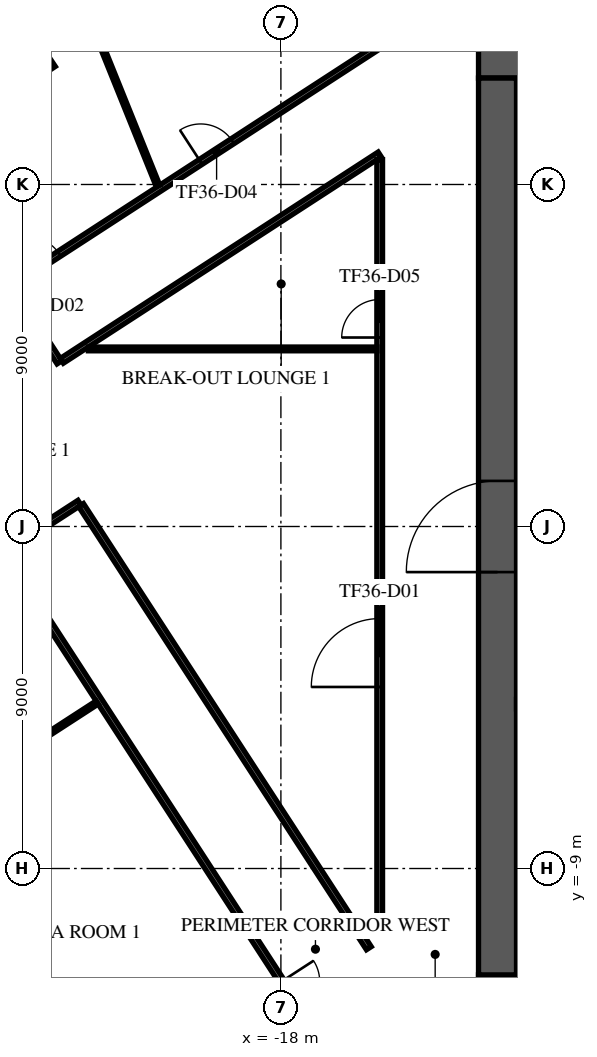
"""IFC4 building model, lengths in metres.
Left out: names, types, materials, properties, quantities, classifications, styles, units other than length and angle.
Written with IfcOpenShell. Run it as: python <this file> out.ifc"""

import sys

from ifc_helpers import new_model, si_unit, direction, frame, frame_2d, origin, origin_2d, place, context, subcontext, project, spatial, rectangle, extrude, element, fill, save


model = new_model("IFC4")
c1 = context("Model", 3, precision=1e-05, world=origin(), true_north=direction((0.0, 1.0)))
c2 = subcontext(c1, "Body", "Model", "MODEL_VIEW")
j1 = project(units=[si_unit("LENGTHUNIT", "METRE"), si_unit("PLANEANGLEUNIT", "RADIAN")], contexts=[c1])
p1 = place(None, origin())
s1 = spatial("IfcSite", under=j1, at=p1, CompositionType="ELEMENT")
p2 = place(p1, origin())
s2 = spatial("IfcBuilding", under=s1, at=p2, CompositionType="ELEMENT")
p3 = place(p2, frame((0.0, 0.0, 155.7)))
s3 = spatial("IfcBuildingStorey", under=s2, at=p3, CompositionType="ELEMENT", Elevation=155.7)
p4 = place(p3, frame((-24.699, 12.258, 0.0), z_axis=(0.0, 0.0, 1.0), x_axis=(0.832028680356, 0.55473261583, 0.0)))
e1 = element("IfcColumn", 1, at=p4, inside=s3, PredefinedType="COLUMN", context=c2, shape_type="SweptSolid", body=[
    extrude(rectangle(XDim=1.1, YDim=1.1, at=origin_2d()), origin(), (0.0, 0.0, 1.0), 4.0),
])
p5 = place(p3, frame((-12.8, 12.3, 0.0), z_axis=(0.0, 0.0, 1.0), x_axis=(1.0, 0.0, 0.0)))
e2 = element("IfcWall", 2, at=p5, inside=s3, PredefinedType="SHEAR", context=c2, shape_type="SweptSolid", body=[
    extrude(rectangle(XDim=25.6, YDim=1.0, at=frame_2d((12.8, 0.0))), origin(), (0.0, 0.0, 1.0), 3.6),
])
p6 = place(p5, frame((11.6, 0.0, 0.0)))
e3 = element("IfcOpeningElement", 3, at=p6, cuts=e2, PredefinedType="OPENING", context=c2, shape_type="SweptSolid", body=[
    extrude(rectangle(XDim=2.4, YDim=2.4, at=frame_2d((1.2, 1.2))), frame((0.0, 0.51, 0.0), z_axis=(0.0, -1.0, 0.0), x_axis=(1.0, 0.0, 0.0)), (0.0, 0.0, 1.0), 1.02),
])
p7 = place(p5, frame((22.425, 0.0, 0.0)))
e4 = element("IfcOpeningElement", 4, at=p7, cuts=e2, PredefinedType="OPENING", context=c2, shape_type="SweptSolid", body=[
    extrude(rectangle(XDim=1.2, YDim=2.1, at=frame_2d((0.6, 1.05))), frame((0.0, 0.51, 0.0), z_axis=(0.0, -1.0, 0.0), x_axis=(1.0, 0.0, 0.0)), (0.0, 0.0, 1.0), 1.02),
])
p8 = place(p5, frame((1.4, 0.0, 0.0)))
e5 = element("IfcOpeningElement", 5, at=p8, cuts=e2, PredefinedType="OPENING", context=c2, shape_type="SweptSolid", body=[
    extrude(rectangle(XDim=1.0, YDim=2.1, at=frame_2d((0.5, 1.05))), frame((0.0, 0.51, 0.0), z_axis=(0.0, -1.0, 0.0), x_axis=(1.0, 0.0, 0.0)), (0.0, 0.0, 1.0), 1.02),
])
p9 = place(p3, frame((-12.8, -12.3, 0.0), z_axis=(0.0, 0.0, 1.0), x_axis=(1.0, 0.0, 0.0)))
e6 = element("IfcWall", 6, at=p9, inside=s3, PredefinedType="SHEAR", context=c2, shape_type="SweptSolid", body=[
    extrude(rectangle(XDim=25.6, YDim=1.0, at=frame_2d((12.8, 0.0))), origin(), (0.0, 0.0, 1.0), 3.6),
])
p10 = place(p9, frame((7.7, 0.0, 0.0)))
e7 = element("IfcOpeningElement", 7, at=p10, cuts=e6, PredefinedType="OPENING", context=c2, shape_type="SweptSolid", body=[
    extrude(rectangle(XDim=2.0, YDim=2.1, at=frame_2d((1.0, 1.05))), frame((0.0, 0.51, 0.0), z_axis=(0.0, -1.0, 0.0), x_axis=(1.0, 0.0, 0.0)), (0.0, 0.0, 1.0), 1.02),
])
p11 = place(p9, frame((17.825, 0.0, 0.0)))
e8 = element("IfcOpeningElement", 8, at=p11, cuts=e6, PredefinedType="OPENING", context=c2, shape_type="SweptSolid", body=[
    extrude(rectangle(XDim=1.2, YDim=2.1, at=frame_2d((0.6, 1.05))), frame((0.0, 0.51, 0.0), z_axis=(0.0, -1.0, 0.0), x_axis=(1.0, 0.0, 0.0)), (0.0, 0.0, 1.0), 1.02),
])
p12 = place(p9, frame((1.975, 0.0, 0.0)))
e9 = element("IfcOpeningElement", 9, at=p12, cuts=e6, PredefinedType="OPENING", context=c2, shape_type="SweptSolid", body=[
    extrude(rectangle(XDim=1.2, YDim=2.1, at=frame_2d((0.6, 1.05))), frame((0.0, 0.51, 0.0), z_axis=(0.0, -1.0, 0.0), x_axis=(1.0, 0.0, 0.0)), (0.0, 0.0, 1.0), 1.02),
])
p13 = place(p9, frame((22.425, 0.0, 0.0)))
e10 = element("IfcOpeningElement", 10, at=p13, cuts=e6, PredefinedType="OPENING", context=c2, shape_type="SweptSolid", body=[
    extrude(rectangle(XDim=1.2, YDim=2.1, at=frame_2d((0.6, 1.05))), frame((0.0, 0.51, 0.0), z_axis=(0.0, -1.0, 0.0), x_axis=(1.0, 0.0, 0.0)), (0.0, 0.0, 1.0), 1.02),
])
p14 = place(p3, frame((-12.3, -11.8, 0.0), z_axis=(0.0, 0.0, 1.0), x_axis=(0.0, 1.0, 0.0)))
e11 = element("IfcWall", 11, at=p14, inside=s3, PredefinedType="SHEAR", context=c2, shape_type="SweptSolid", body=[
    extrude(rectangle(XDim=23.6, YDim=1.0, at=frame_2d((11.8, 0.0))), origin(), (0.0, 0.0, 1.0), 3.6),
])
p15 = place(p14, frame((10.6, 0.0, 0.0)))
e12 = element("IfcOpeningElement", 12, at=p15, cuts=e11, PredefinedType="OPENING", context=c2, shape_type="SweptSolid", body=[
    extrude(rectangle(XDim=2.4, YDim=2.4, at=frame_2d((1.2, 1.2))), frame((0.0, 0.51, 0.0), z_axis=(0.0, -1.0, 0.0), x_axis=(1.0, 0.0, 0.0)), (0.0, 0.0, 1.0), 1.02),
])
p16 = place(p3, frame((-8.65, -4.675, 0.0), z_axis=(0.0, 0.0, 1.0), x_axis=(-1.0, 0.0, 0.0)))
e13 = element("IfcWall", 13, at=p16, inside=s3, PredefinedType="SOLIDWALL", context=c2, shape_type="SweptSolid", body=[
    extrude(rectangle(XDim=3.15, YDim=0.25, at=frame_2d((1.575, 0.0))), origin(), (0.0, 0.0, 1.0), 3.6),
])
p17 = place(p3, frame((6.333, 35.233, 0.0), z_axis=(0.0, 0.0, 1.0), x_axis=(-0.83867264201, -0.544635841222, 0.0)))
e14 = element("IfcWall", 14, at=p17, inside=s3, PredefinedType="STANDARD", context=c2, shape_type="SweptSolid", body=[
    extrude(rectangle(XDim=49.376, YDim=0.6, at=frame_2d((24.688, 0.0))), origin(), (0.0, 0.0, 1.0), 3.6),
])
p18 = place(p17, frame((1.2, 0.0, 0.9)))
e15 = element("IfcOpeningElement", 15, at=p18, cuts=e14, PredefinedType="OPENING", context=c2, shape_type="SweptSolid", body=[
    extrude(rectangle(XDim=2.1, YDim=2.1, at=frame_2d((1.05, 1.05))), frame((0.0, 0.31, 0.0), z_axis=(0.0, -1.0, 0.0), x_axis=(1.0, 0.0, 0.0)), (0.0, 0.0, 1.0), 0.62),
])
p19 = place(p17, frame((5.7, 0.0, 0.9)))
e16 = element("IfcOpeningElement", 16, at=p19, cuts=e14, PredefinedType="OPENING", context=c2, shape_type="SweptSolid", body=[
    extrude(rectangle(XDim=2.1, YDim=2.1, at=frame_2d((1.05, 1.05))), frame((0.0, 0.31, 0.0), z_axis=(0.0, -1.0, 0.0), x_axis=(1.0, 0.0, 0.0)), (0.0, 0.0, 1.0), 0.62),
])
p20 = place(p17, frame((10.2, 0.0, 0.9)))
e17 = element("IfcOpeningElement", 17, at=p20, cuts=e14, PredefinedType="OPENING", context=c2, shape_type="SweptSolid", body=[
    extrude(rectangle(XDim=2.1, YDim=2.1, at=frame_2d((1.05, 1.05))), frame((0.0, 0.31, 0.0), z_axis=(0.0, -1.0, 0.0), x_axis=(1.0, 0.0, 0.0)), (0.0, 0.0, 1.0), 0.62),
])
p21 = place(p17, frame((14.7, 0.0, 0.9)))
e18 = element("IfcOpeningElement", 18, at=p21, cuts=e14, PredefinedType="OPENING", context=c2, shape_type="SweptSolid", body=[
    extrude(rectangle(XDim=2.1, YDim=2.1, at=frame_2d((1.05, 1.05))), frame((0.0, 0.31, 0.0), z_axis=(0.0, -1.0, 0.0), x_axis=(1.0, 0.0, 0.0)), (0.0, 0.0, 1.0), 0.62),
])
p22 = place(p17, frame((19.2, 0.0, 0.9)))
e19 = element("IfcOpeningElement", 19, at=p22, cuts=e14, PredefinedType="OPENING", context=c2, shape_type="SweptSolid", body=[
    extrude(rectangle(XDim=2.1, YDim=2.1, at=frame_2d((1.05, 1.05))), frame((0.0, 0.31, 0.0), z_axis=(0.0, -1.0, 0.0), x_axis=(1.0, 0.0, 0.0)), (0.0, 0.0, 1.0), 0.62),
])
p23 = place(p17, frame((23.7, 0.0, 0.9)))
e20 = element("IfcOpeningElement", 20, at=p23, cuts=e14, PredefinedType="OPENING", context=c2, shape_type="SweptSolid", body=[
    extrude(rectangle(XDim=2.1, YDim=2.1, at=frame_2d((1.05, 1.05))), frame((0.0, 0.31, 0.0), z_axis=(0.0, -1.0, 0.0), x_axis=(1.0, 0.0, 0.0)), (0.0, 0.0, 1.0), 0.62),
])
p24 = place(p17, frame((28.2, 0.0, 0.9)))
e21 = element("IfcOpeningElement", 21, at=p24, cuts=e14, PredefinedType="OPENING", context=c2, shape_type="SweptSolid", body=[
    extrude(rectangle(XDim=2.1, YDim=2.1, at=frame_2d((1.05, 1.05))), frame((0.0, 0.31, 0.0), z_axis=(0.0, -1.0, 0.0), x_axis=(1.0, 0.0, 0.0)), (0.0, 0.0, 1.0), 0.62),
])
p25 = place(p17, frame((32.7, 0.0, 0.9)))
e22 = element("IfcOpeningElement", 22, at=p25, cuts=e14, PredefinedType="OPENING", context=c2, shape_type="SweptSolid", body=[
    extrude(rectangle(XDim=2.1, YDim=2.1, at=frame_2d((1.05, 1.05))), frame((0.0, 0.31, 0.0), z_axis=(0.0, -1.0, 0.0), x_axis=(1.0, 0.0, 0.0)), (0.0, 0.0, 1.0), 0.62),
])
p26 = place(p17, frame((37.2, 0.0, 0.9)))
e23 = element("IfcOpeningElement", 23, at=p26, cuts=e14, PredefinedType="OPENING", context=c2, shape_type="SweptSolid", body=[
    extrude(rectangle(XDim=2.1, YDim=2.1, at=frame_2d((1.05, 1.05))), frame((0.0, 0.31, 0.0), z_axis=(0.0, -1.0, 0.0), x_axis=(1.0, 0.0, 0.0)), (0.0, 0.0, 1.0), 0.62),
])
p27 = place(p17, frame((41.7, 0.0, 0.9)))
e24 = element("IfcOpeningElement", 24, at=p27, cuts=e14, PredefinedType="OPENING", context=c2, shape_type="SweptSolid", body=[
    extrude(rectangle(XDim=2.1, YDim=2.1, at=frame_2d((1.05, 1.05))), frame((0.0, 0.31, 0.0), z_axis=(0.0, -1.0, 0.0), x_axis=(1.0, 0.0, 0.0)), (0.0, 0.0, 1.0), 0.62),
])
p28 = place(p17, frame((46.138, 0.0, 0.9)))
e25 = element("IfcOpeningElement", 25, at=p28, cuts=e14, PredefinedType="OPENING", context=c2, shape_type="SweptSolid", body=[
    extrude(rectangle(XDim=2.1, YDim=2.1, at=frame_2d((1.05, 1.05))), frame((0.0, 0.31, 0.0), z_axis=(0.0, -1.0, 0.0), x_axis=(1.0, 0.0, 0.0)), (0.0, 0.0, 1.0), 0.62),
])
p29 = place(p3, frame((-36.496, 1.667, 0.0), z_axis=(0.0, 0.0, 1.0), x_axis=(0.544642236407, -0.838668488929, 0.0)))
e26 = element("IfcWall", 26, at=p29, inside=s3, PredefinedType="STANDARD", context=c2, shape_type="SweptSolid", body=[
    extrude(rectangle(XDim=42.552, YDim=0.6, at=frame_2d((21.276, 0.0))), origin(), (0.0, 0.0, 1.0), 3.6),
])
p30 = place(p29, frame((1.178, 0.0, 0.9)))
e27 = element("IfcOpeningElement", 27, at=p30, cuts=e26, PredefinedType="OPENING", context=c2, shape_type="SweptSolid", body=[
    extrude(rectangle(XDim=1.8, YDim=2.1, at=frame_2d((0.9, 1.05))), frame((0.0, 0.31, 0.0), z_axis=(0.0, -1.0, 0.0), x_axis=(1.0, 0.0, 0.0)), (0.0, 0.0, 1.0), 0.62),
])
p31 = place(p29, frame((5.396, 0.0, 0.9)))
e28 = element("IfcOpeningElement", 28, at=p31, cuts=e26, PredefinedType="OPENING", context=c2, shape_type="SweptSolid", body=[
    extrude(rectangle(XDim=1.8, YDim=2.1, at=frame_2d((0.9, 1.05))), frame((0.0, 0.31, 0.0), z_axis=(0.0, -1.0, 0.0), x_axis=(1.0, 0.0, 0.0)), (0.0, 0.0, 1.0), 0.62),
])
p32 = place(p29, frame((9.676, 0.0, 0.9)))
e29 = element("IfcOpeningElement", 29, at=p32, cuts=e26, PredefinedType="OPENING", context=c2, shape_type="SweptSolid", body=[
    extrude(rectangle(XDim=1.8, YDim=2.1, at=frame_2d((0.9, 1.05))), frame((0.0, 0.31, 0.0), z_axis=(0.0, -1.0, 0.0), x_axis=(1.0, 0.0, 0.0)), (0.0, 0.0, 1.0), 0.62),
])
p33 = place(p29, frame((13.956, 0.0, 0.9)))
e30 = element("IfcOpeningElement", 30, at=p33, cuts=e26, PredefinedType="OPENING", context=c2, shape_type="SweptSolid", body=[
    extrude(rectangle(XDim=1.8, YDim=2.1, at=frame_2d((0.9, 1.05))), frame((0.0, 0.31, 0.0), z_axis=(0.0, -1.0, 0.0), x_axis=(1.0, 0.0, 0.0)), (0.0, 0.0, 1.0), 0.62),
])
p34 = place(p29, frame((18.236, 0.0, 0.9)))
e31 = element("IfcOpeningElement", 31, at=p34, cuts=e26, PredefinedType="OPENING", context=c2, shape_type="SweptSolid", body=[
    extrude(rectangle(XDim=1.8, YDim=2.1, at=frame_2d((0.9, 1.05))), frame((0.0, 0.31, 0.0), z_axis=(0.0, -1.0, 0.0), x_axis=(1.0, 0.0, 0.0)), (0.0, 0.0, 1.0), 0.62),
])
p35 = place(p29, frame((22.516, 0.0, 0.9)))
e32 = element("IfcOpeningElement", 32, at=p35, cuts=e26, PredefinedType="OPENING", context=c2, shape_type="SweptSolid", body=[
    extrude(rectangle(XDim=1.8, YDim=2.1, at=frame_2d((0.9, 1.05))), frame((0.0, 0.31, 0.0), z_axis=(0.0, -1.0, 0.0), x_axis=(1.0, 0.0, 0.0)), (0.0, 0.0, 1.0), 0.62),
])
p36 = place(p29, frame((26.796, 0.0, 0.9)))
e33 = element("IfcOpeningElement", 33, at=p36, cuts=e26, PredefinedType="OPENING", context=c2, shape_type="SweptSolid", body=[
    extrude(rectangle(XDim=1.8, YDim=2.1, at=frame_2d((0.9, 1.05))), frame((0.0, 0.31, 0.0), z_axis=(0.0, -1.0, 0.0), x_axis=(1.0, 0.0, 0.0)), (0.0, 0.0, 1.0), 0.62),
])
p37 = place(p29, frame((31.076, 0.0, 0.9)))
e34 = element("IfcOpeningElement", 34, at=p37, cuts=e26, PredefinedType="OPENING", context=c2, shape_type="SweptSolid", body=[
    extrude(rectangle(XDim=1.8, YDim=2.1, at=frame_2d((0.9, 1.05))), frame((0.0, 0.31, 0.0), z_axis=(0.0, -1.0, 0.0), x_axis=(1.0, 0.0, 0.0)), (0.0, 0.0, 1.0), 0.62),
])
p38 = place(p29, frame((35.356, 0.0, 0.9)))
e35 = element("IfcOpeningElement", 35, at=p38, cuts=e26, PredefinedType="OPENING", context=c2, shape_type="SweptSolid", body=[
    extrude(rectangle(XDim=1.8, YDim=2.1, at=frame_2d((0.9, 1.05))), frame((0.0, 0.31, 0.0), z_axis=(0.0, -1.0, 0.0), x_axis=(1.0, 0.0, 0.0)), (0.0, 0.0, 1.0), 0.62),
])
p39 = place(p29, frame((39.573, 0.0, 0.9)))
e36 = element("IfcOpeningElement", 36, at=p39, cuts=e26, PredefinedType="OPENING", context=c2, shape_type="SweptSolid", body=[
    extrude(rectangle(XDim=1.8, YDim=2.1, at=frame_2d((0.9, 1.05))), frame((0.0, 0.31, 0.0), z_axis=(0.0, -1.0, 0.0), x_axis=(1.0, 0.0, 0.0)), (0.0, 0.0, 1.0), 0.62),
])
p40 = place(p3, frame((-25.312, -0.681, 0.0), z_axis=(0.0, 0.0, 1.0), x_axis=(0.838734016275, 0.544541320694, 0.0)))
e37 = element("IfcWall", 37, at=p40, inside=s3, PredefinedType="PARTITIONING", context=c2, shape_type="SweptSolid", body=[
    extrude(rectangle(XDim=2.4, YDim=0.15, at=frame_2d((1.2, 0.0))), origin(), (0.0, 0.0, 1.0), 3.15),
])
p41 = place(p3, frame((-25.271, -0.744, 0.0), z_axis=(0.0, 0.0, 1.0), x_axis=(0.544659433471, -0.838657320681, 0.0)))
e38 = element("IfcWall", 38, at=p41, inside=s3, PredefinedType="PARTITIONING", context=c2, shape_type="SweptSolid", body=[
    extrude(rectangle(XDim=26.354, YDim=0.15, at=frame_2d((13.177, 0.0))), origin(), (0.0, 0.0, 1.0), 3.15),
])
p42 = place(p41, frame((13.388, 0.0, 0.0)))
e39 = element("IfcOpeningElement", 39, at=p42, cuts=e38, PredefinedType="OPENING", context=c2, shape_type="SweptSolid", body=[
    extrude(rectangle(XDim=1.0, YDim=2.1, at=frame_2d((0.5, 1.05))), frame((0.0, 0.085, 0.0), z_axis=(0.0, -1.0, 0.0), x_axis=(1.0, 0.0, 0.0)), (0.0, 0.0, 1.0), 0.17),
])
p43 = place(p41, frame((21.137, 0.0, 0.0)))
e40 = element("IfcOpeningElement", 40, at=p43, cuts=e38, PredefinedType="OPENING", context=c2, shape_type="SweptSolid", body=[
    extrude(rectangle(XDim=1.8, YDim=2.1, at=frame_2d((0.9, 1.05))), frame((0.0, 0.085, 0.0), z_axis=(0.0, -1.0, 0.0), x_axis=(1.0, 0.0, 0.0)), (0.0, 0.0, 1.0), 0.17),
])
p44 = place(p3, frame((-25.134, 6.331, 0.0), z_axis=(0.0, 0.0, 1.0), x_axis=(0.838655992286, 0.544661478904, 0.0)))
e41 = element("IfcWall", 41, at=p44, inside=s3, PredefinedType="PARTITIONING", context=c2, shape_type="SweptSolid", body=[
    extrude(rectangle(XDim=35.262, YDim=0.15, at=frame_2d((17.631, 0.0))), origin(), (0.0, 0.0, 1.0), 3.15),
])
p45 = place(p44, frame((0.55, 0.0, 0.0)))
e42 = element("IfcOpeningElement", 42, at=p45, cuts=e41, PredefinedType="OPENING", context=c2, shape_type="SweptSolid", body=[
    extrude(rectangle(XDim=1.0, YDim=2.1, at=frame_2d((0.5, 1.05))), frame((0.0, 0.085, 0.0), z_axis=(0.0, -1.0, 0.0), x_axis=(1.0, 0.0, 0.0)), (0.0, 0.0, 1.0), 0.17),
])
p46 = place(p44, frame((5.989, 0.0, 0.0)))
e43 = element("IfcOpeningElement", 43, at=p46, cuts=e41, PredefinedType="OPENING", context=c2, shape_type="SweptSolid", body=[
    extrude(rectangle(XDim=1.0, YDim=2.1, at=frame_2d((0.5, 1.05))), frame((0.0, 0.085, 0.0), z_axis=(0.0, -1.0, 0.0), x_axis=(1.0, 0.0, 0.0)), (0.0, 0.0, 1.0), 0.17),
])
p47 = place(p44, frame((17.183, 0.0, 0.0)))
e44 = element("IfcOpeningElement", 44, at=p47, cuts=e41, PredefinedType="OPENING", context=c2, shape_type="SweptSolid", body=[
    extrude(rectangle(XDim=1.0, YDim=2.1, at=frame_2d((0.5, 1.05))), frame((0.0, 0.085, 0.0), z_axis=(0.0, -1.0, 0.0), x_axis=(1.0, 0.0, 0.0)), (0.0, 0.0, 1.0), 0.17),
])
p48 = place(p44, frame((25.102, 0.0, 0.0)))
e45 = element("IfcOpeningElement", 45, at=p48, cuts=e41, PredefinedType="OPENING", context=c2, shape_type="SweptSolid", body=[
    extrude(rectangle(XDim=1.0, YDim=2.1, at=frame_2d((0.5, 1.05))), frame((0.0, 0.085, 0.0), z_axis=(0.0, -1.0, 0.0), x_axis=(1.0, 0.0, 0.0)), (0.0, 0.0, 1.0), 0.17),
])
p49 = place(p3, frame((-25.093, 6.268, 0.0), z_axis=(0.0, 0.0, 1.0), x_axis=(0.544770485594, -0.838585188294, 0.0)))
e46 = element("IfcWall", 46, at=p49, inside=s3, PredefinedType="PARTITIONING", context=c2, shape_type="SweptSolid", body=[
    extrude(rectangle(XDim=2.324, YDim=0.15, at=frame_2d((1.162, 0.0))), origin(), (0.0, 0.0, 1.0), 3.15),
])
p50 = place(p3, frame((-23.764, 4.36, 0.0), z_axis=(0.0, 0.0, 1.0), x_axis=(0.838700804406, 0.544592472119, 0.0)))
e47 = element("IfcWall", 47, at=p50, inside=s3, PredefinedType="PARTITIONING", context=c2, shape_type="SweptSolid", body=[
    extrude(rectangle(XDim=9.973, YDim=0.15, at=frame_2d((4.986, 0.0))), origin(), (0.0, 0.0, 1.0), 3.15),
])
p51 = place(p3, frame((-23.258, 0.563, 0.0), z_axis=(0.0, 0.0, 1.0), x_axis=(0.544638327972, -0.838671027104, 0.0)))
e48 = element("IfcWall", 48, at=p51, inside=s3, PredefinedType="PARTITIONING", context=c2, shape_type="SweptSolid", body=[
    extrude(rectangle(XDim=13.903, YDim=0.15, at=frame_2d((6.951, 0.0))), origin(), (0.0, 0.0, 1.0), 3.15),
])
p52 = place(p3, frame((-15.4, -10.773, 0.0), z_axis=(0.0, 0.0, 1.0), x_axis=(0.0, 1.0, 0.0)))
e49 = element("IfcWall", 49, at=p52, inside=s3, PredefinedType="PARTITIONING", context=c2, shape_type="SweptSolid", body=[
    extrude(rectangle(XDim=20.426, YDim=0.15, at=frame_2d((10.213, 0.0))), origin(), (0.0, 0.0, 1.0), 3.15),
])
p53 = place(p52, frame((6.55, 0.0, 0.0)))
e50 = element("IfcOpeningElement", 50, at=p53, cuts=e49, PredefinedType="OPENING", context=c2, shape_type="SweptSolid", body=[
    extrude(rectangle(XDim=1.8, YDim=2.1, at=frame_2d((0.9, 1.05))), frame((0.0, 0.085, 0.0), z_axis=(0.0, -1.0, 0.0), x_axis=(1.0, 0.0, 0.0)), (0.0, 0.0, 1.0), 0.17),
])
p54 = place(p52, frame((15.746, 0.0, 0.0)))
e51 = element("IfcOpeningElement", 51, at=p54, cuts=e49, PredefinedType="OPENING", context=c2, shape_type="SweptSolid", body=[
    extrude(rectangle(XDim=1.0, YDim=2.1, at=frame_2d((0.5, 1.05))), frame((0.0, 0.085, 0.0), z_axis=(0.0, -1.0, 0.0), x_axis=(1.0, 0.0, 0.0)), (0.0, 0.0, 1.0), 0.17),
])
p55 = place(p3, frame((-29.317, -8.833, 0.0), z_axis=(0.0, 0.0, 1.0), x_axis=(0.839172220575, 0.543865777757, 0.0)))
e52 = element("IfcWall", 52, at=p55, inside=s3, PredefinedType="PARTITIONING", context=c2, shape_type="SweptSolid", body=[
    extrude(rectangle(XDim=7.724, YDim=0.1, at=frame_2d((3.862, 0.0))), origin(), (0.0, 0.0, 1.0), 2.9),
])
p56 = place(p3, frame((-23.792, 15.31, 0.0), z_axis=(0.0, 0.0, 1.0), x_axis=(0.373850501152, -0.927488977179, 0.0)))
e53 = element("IfcWall", 53, at=p56, inside=s3, PredefinedType="PARTITIONING", context=c2, shape_type="SweptSolid", body=[
    extrude(rectangle(XDim=6.841, YDim=0.1, at=frame_2d((3.421, 0.0))), origin(), (0.0, 0.0, 1.0), 2.9),
])
p57 = place(p3, frame((-23.066, 4.673, 0.0), z_axis=(0.0, 0.0, 1.0), x_axis=(1.0, 0.0, 0.0)))
e54 = element("IfcWall", 54, at=p57, inside=s3, PredefinedType="PARTITIONING", context=c2, shape_type="SweptSolid", body=[
    extrude(rectangle(XDim=7.591, YDim=0.1, at=frame_2d((3.796, 0.0))), origin(), (0.0, 0.0, 1.0), 3.6),
])
p58 = place(p15, origin())
e55 = element("IfcDoor", 55, at=p58, inside=s3, OperationType="SINGLE_SWING_LEFT", PredefinedType="DOOR", context=c2, shape_type="SweptSolid", body=[
    extrude(rectangle(XDim=2.4, YDim=2.4, at=frame_2d((1.2, 1.2))), frame((0.0, 0.025, 0.0), z_axis=(0.0, -1.0, 0.0), x_axis=(1.0, 0.0, 0.0)), (0.0, 0.0, 1.0), 0.05),
])
fill(e12, e55)
p59 = place(p53, origin())
e56 = element("IfcDoor", 56, at=p59, inside=s3, OperationType="DOUBLE_DOOR_SINGLE_SWING", PredefinedType="DOOR", context=c2, shape_type="SweptSolid", body=[
    extrude(rectangle(XDim=1.8, YDim=2.1, at=frame_2d((0.9, 1.05))), frame((0.0, 0.025, 0.0), z_axis=(0.0, -1.0, 0.0), x_axis=(1.0, 0.0, 0.0)), (0.0, 0.0, 1.0), 0.05),
])
fill(e50, e56)
p60 = place(p45, origin())
e57 = element("IfcDoor", 57, at=p60, inside=s3, OperationType="SINGLE_SWING_RIGHT", PredefinedType="DOOR", context=c2, shape_type="SweptSolid", body=[
    extrude(rectangle(XDim=1.0, YDim=2.1, at=frame_2d((0.5, 1.05))), frame((0.0, 0.025, 0.0), z_axis=(0.0, -1.0, 0.0), x_axis=(1.0, 0.0, 0.0)), (0.0, 0.0, 1.0), 0.05),
])
fill(e42, e57)
p61 = place(p46, origin())
e58 = element("IfcDoor", 58, at=p61, inside=s3, OperationType="SINGLE_SWING_LEFT", PredefinedType="DOOR", context=c2, shape_type="SweptSolid", body=[
    extrude(rectangle(XDim=1.0, YDim=2.1, at=frame_2d((0.5, 1.05))), frame((0.0, 0.025, 0.0), z_axis=(0.0, -1.0, 0.0), x_axis=(1.0, 0.0, 0.0)), (0.0, 0.0, 1.0), 0.05),
])
fill(e43, e58)
p62 = place(p54, origin())
e59 = element("IfcDoor", 59, at=p62, inside=s3, OperationType="SINGLE_SWING_RIGHT", PredefinedType="DOOR", context=c2, shape_type="SweptSolid", body=[
    extrude(rectangle(XDim=1.0, YDim=2.1, at=frame_2d((0.5, 1.05))), frame((0.0, 0.025, 0.0), z_axis=(0.0, -1.0, 0.0), x_axis=(1.0, 0.0, 0.0)), (0.0, 0.0, 1.0), 0.05),
])
fill(e51, e59)
save(model, sys.argv[1])
